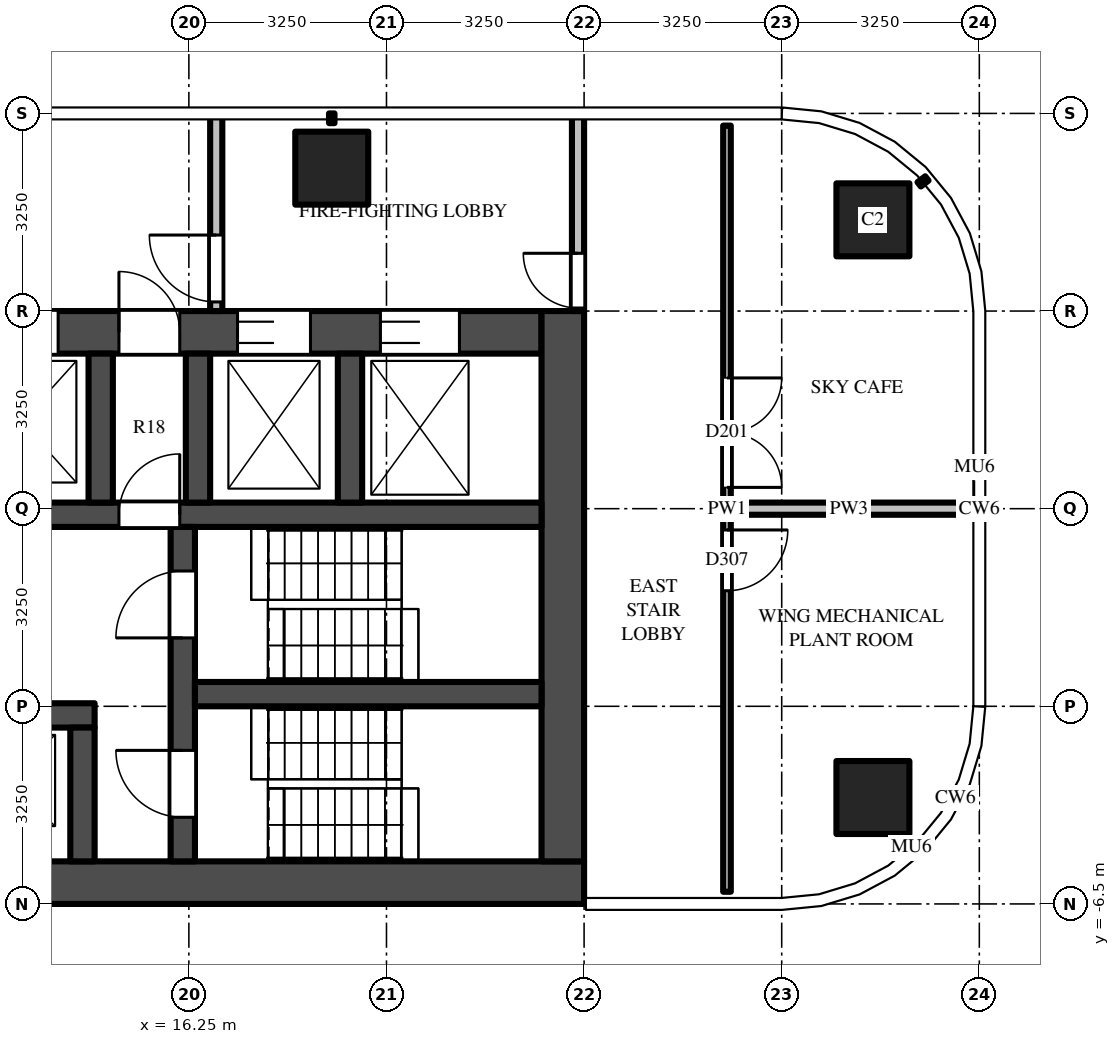
"""IFC4 building model, lengths in metres.
Left out: names, types, materials, properties, quantities, classifications, styles, units other than length and angle.
Written with IfcOpenShell. Run it as: python <this file> out.ifc"""

import sys

from ifc_helpers import new_model, si_unit, direction, frame, frame_2d, origin, origin_2d, place, context, subcontext, project, spatial, rectangle, extrude, source, transform, mapped, element, fill, save


model = new_model("IFC4")
c1 = context("Model", 3, precision=1e-05, world=origin(), true_north=direction((0.0, 1.0)))
c2 = subcontext(c1, "Body", "Model", "MODEL_VIEW")
j1 = project(units=[si_unit("LENGTHUNIT", "METRE"), si_unit("PLANEANGLEUNIT", "RADIAN")], contexts=[c1])
p1 = place(None, origin())
s1 = spatial("IfcSite", under=j1, at=p1, CompositionType="ELEMENT")
p2 = place(p1, origin())
s2 = spatial("IfcBuilding", under=s1, at=p2, CompositionType="ELEMENT")
p3 = place(p2, frame((0.0, 0.0, 156.0)))
s3 = spatial("IfcBuildingStorey", under=s2, at=p3, CompositionType="ELEMENT", Elevation=156.0)
m1 = source(origin(), c2, "Body", "SweptSolid", [
    extrude(rectangle(XDim=1.2, YDim=1.2, at=origin_2d()), origin(), (0.0, 0.0, 1.0), 6.0),
])
for number, where, z_axis, x_axis in (
    (1, (18.6, 5.6, 0.0), (0.0, 0.0, 1.0), (1.0, 0.0, 0.0)),
    (2, (27.5, 4.75, 0.0), (0.0, 0.0, 1.0), (1.0, 0.0, 0.0)),
    (3, (27.5, -4.75, 0.0), (0.0, 0.0, 1.0), (1.0, 0.0, 0.0)),
):
    element("IfcColumn", number, at=place(p3, frame(where, z_axis=z_axis, x_axis=x_axis)), inside=s3, PredefinedType="COLUMN", context=c2, shape_type="MappedRepresentation", body=[
        mapped(m1, transform((0.0, 0.0, 0.0))),
    ])
m2 = source(origin(), c2, "Body", "SweptSolid", [
    extrude(rectangle(XDim=16.55, YDim=0.7, at=frame_2d((8.275, 0.0))), origin(), (0.0, 0.0, 1.0), 5.8),
])
p4 = place(p3, frame((6.2, -6.15, 0.0), z_axis=(0.0, 0.0, 1.0), x_axis=(1.0, 0.0, 0.0)))
e4 = element("IfcWall", 4, at=p4, inside=s3, PredefinedType="SHEAR", context=c2, shape_type="MappedRepresentation", body=[
    mapped(m2, transform((0.0, 0.0, 0.0))),
])
m3 = source(origin(), c2, "Body", "SweptSolid", [
    extrude(rectangle(XDim=14.85, YDim=0.7, at=frame_2d((7.425, 0.0))), origin(), (0.0, 0.0, 1.0), 5.8),
])
p5 = place(p3, frame((7.2, 2.9, 0.0), z_axis=(0.0, 0.0, 1.0), x_axis=(1.0, 0.0, 0.0)))
e5 = element("IfcWall", 5, at=p5, inside=s3, PredefinedType="SHEAR", context=c2, shape_type="MappedRepresentation", body=[
    mapped(m3, transform((0.0, 0.0, 0.0))),
])
m4 = source(origin(), c2, "Body", "SweptSolid", [
    extrude(rectangle(XDim=1.1, YDim=2.1, at=frame_2d((0.55, 1.05))), frame((0.0, 0.36, 0.0), z_axis=(0.0, -1.0, 0.0), x_axis=(1.0, 0.0, 0.0)), (0.0, 0.0, 1.0), 0.72),
])
p6 = place(p5, frame((0.55, 0.0, 0.0)))
e6 = element("IfcOpeningElement", 6, at=p6, cuts=e5, PredefinedType="OPENING", context=c2, shape_type="MappedRepresentation", body=[
    mapped(m4, transform((0.0, 0.0, 0.0))),
])
p7 = place(p5, frame((3.15, 0.0, 0.0)))
e7 = element("IfcOpeningElement", 7, at=p7, cuts=e5, PredefinedType="OPENING", context=c2, shape_type="MappedRepresentation", body=[
    mapped(m4, transform((0.0, 0.0, 0.0))),
])
m5 = source(origin(), c2, "Body", "SweptSolid", [
    extrude(rectangle(XDim=1.2, YDim=2.1, at=frame_2d((0.6, 1.05))), frame((0.0, 0.36, 0.0), z_axis=(0.0, -1.0, 0.0), x_axis=(1.0, 0.0, 0.0)), (0.0, 0.0, 1.0), 0.72),
])
p8 = place(p5, frame((5.7, 0.0, 0.0)))
e8 = element("IfcOpeningElement", 8, at=p8, cuts=e5, PredefinedType="OPENING", context=c2, shape_type="MappedRepresentation", body=[
    mapped(m5, transform((0.0, 0.0, 0.0))),
])
m6 = source(origin(), c2, "Body", "SweptSolid", [
    extrude(rectangle(XDim=1.3, YDim=2.1, at=frame_2d((0.65, 1.05))), frame((0.0, 0.36, 0.0), z_axis=(0.0, -1.0, 0.0), x_axis=(1.0, 0.0, 0.0)), (0.0, 0.0, 1.0), 0.72),
])
p9 = place(p5, frame((12.2, 0.0, 0.0)))
e9 = element("IfcOpeningElement", 9, at=p9, cuts=e5, PredefinedType="OPENING", context=c2, shape_type="MappedRepresentation", body=[
    mapped(m6, transform((0.0, 0.0, 0.0))),
])
p10 = place(p5, frame((9.85, 0.0, 0.0)))
e10 = element("IfcOpeningElement", 10, at=p10, cuts=e5, PredefinedType="OPENING", context=c2, shape_type="MappedRepresentation", body=[
    mapped(m5, transform((0.0, 0.0, 0.0))),
])
m7 = source(origin(), c2, "Body", "SweptSolid", [
    extrude(rectangle(XDim=1.0, YDim=2.1, at=frame_2d((0.5, 1.05))), frame((0.0, 0.36, 0.0), z_axis=(0.0, -1.0, 0.0), x_axis=(1.0, 0.0, 0.0)), (0.0, 0.0, 1.0), 0.72),
])
p11 = place(p5, frame((7.9, 0.0, 0.0)))
e11 = element("IfcOpeningElement", 11, at=p11, cuts=e5, PredefinedType="OPENING", context=c2, shape_type="MappedRepresentation", body=[
    mapped(m7, transform((0.0, 0.0, 0.0))),
])
m8 = source(origin(), c2, "Body", "SweptSolid", [
    extrude(rectangle(XDim=9.05, YDim=0.7, at=frame_2d((4.525, 0.0))), origin(), (0.0, 0.0, 1.0), 5.8),
])
p12 = place(p3, frame((22.4, -5.8, 0.0), z_axis=(0.0, 0.0, 1.0), x_axis=(0.0, 1.0, 0.0)))
e12 = element("IfcWall", 12, at=p12, inside=s3, PredefinedType="SHEAR", context=c2, shape_type="MappedRepresentation", body=[
    mapped(m8, transform((0.0, 0.0, 0.0))),
])
m9 = source(origin(), c2, "Body", "SweptSolid", [
    extrude(rectangle(XDim=7.5, YDim=0.4, at=frame_2d((3.75, 0.0))), origin(), (0.0, 0.0, 1.0), 5.8),
])
p13 = place(p3, frame((7.2, -3.4, 0.0), z_axis=(0.0, 0.0, 1.0), x_axis=(1.0, 0.0, 0.0)))
e13 = element("IfcWall", 13, at=p13, inside=s3, PredefinedType="SHEAR", context=c2, shape_type="MappedRepresentation", body=[
    mapped(m9, transform((0.0, 0.0, 0.0))),
])
m10 = source(origin(), c2, "Body", "SweptSolid", [
    extrude(rectangle(XDim=1.1, YDim=2.1, at=frame_2d((0.55, 1.05))), frame((0.0, 0.21, 0.0), z_axis=(0.0, -1.0, 0.0), x_axis=(1.0, 0.0, 0.0)), (0.0, 0.0, 1.0), 0.42),
])
p14 = place(p13, frame((0.5, 0.0, 0.0)))
e14 = element("IfcOpeningElement", 14, at=p14, cuts=e13, PredefinedType="OPENING", context=c2, shape_type="MappedRepresentation", body=[
    mapped(m10, transform((0.0, 0.0, 0.0))),
])
p15 = place(p13, frame((3.0, 0.0, 0.0)))
e15 = element("IfcOpeningElement", 15, at=p15, cuts=e13, PredefinedType="OPENING", context=c2, shape_type="MappedRepresentation", body=[
    mapped(m10, transform((0.0, 0.0, 0.0))),
])
p16 = place(p13, frame((5.5, 0.0, 0.0)))
e16 = element("IfcOpeningElement", 16, at=p16, cuts=e13, PredefinedType="OPENING", context=c2, shape_type="MappedRepresentation", body=[
    mapped(m10, transform((0.0, 0.0, 0.0))),
])
m11 = source(origin(), c2, "Body", "SweptSolid", [
    extrude(rectangle(XDim=14.85, YDim=0.4, at=frame_2d((7.425, 0.0))), origin(), (0.0, 0.0, 1.0), 5.8),
])
p17 = place(p3, frame((7.2, -0.1, 0.0), z_axis=(0.0, 0.0, 1.0), x_axis=(1.0, 0.0, 0.0)))
e17 = element("IfcWall", 17, at=p17, inside=s3, PredefinedType="SHEAR", context=c2, shape_type="MappedRepresentation", body=[
    mapped(m11, transform((0.0, 0.0, 0.0))),
])
m12 = source(origin(), c2, "Body", "SweptSolid", [
    extrude(rectangle(XDim=1.0, YDim=2.1, at=frame_2d((0.5, 1.05))), frame((0.0, 0.21, 0.0), z_axis=(0.0, -1.0, 0.0), x_axis=(1.0, 0.0, 0.0)), (0.0, 0.0, 1.0), 0.42),
])
p18 = place(p17, frame((7.9, 0.0, 0.0)))
e18 = element("IfcOpeningElement", 18, at=p18, cuts=e17, PredefinedType="OPENING", context=c2, shape_type="MappedRepresentation", body=[
    mapped(m12, transform((0.0, 0.0, 0.0))),
])
m13 = source(origin(), c2, "Body", "SweptSolid", [
    extrude(rectangle(XDim=5.5, YDim=0.4, at=frame_2d((2.75, 0.0))), origin(), (0.0, 0.0, 1.0), 5.8),
])
p19 = place(p3, frame((16.15, -5.8, 0.0), z_axis=(0.0, 0.0, 1.0), x_axis=(0.0, 1.0, 0.0)))
e19 = element("IfcWall", 19, at=p19, inside=s3, PredefinedType="SHEAR", context=c2, shape_type="MappedRepresentation", body=[
    mapped(m13, transform((0.0, 0.0, 0.0))),
])
p20 = place(p19, frame((0.725, 0.0, 0.0)))
e20 = element("IfcOpeningElement", 20, at=p20, cuts=e19, PredefinedType="OPENING", context=c2, shape_type="MappedRepresentation", body=[
    mapped(m10, transform((0.0, 0.0, 0.0))),
])
p21 = place(p19, frame((3.675, 0.0, 0.0)))
e21 = element("IfcOpeningElement", 21, at=p21, cuts=e19, PredefinedType="OPENING", context=c2, shape_type="MappedRepresentation", body=[
    mapped(m10, transform((0.0, 0.0, 0.0))),
])
m14 = source(origin(), c2, "Body", "SweptSolid", [
    extrude(rectangle(XDim=5.7, YDim=0.4, at=frame_2d((2.85, 0.0))), origin(), (0.0, 0.0, 1.0), 5.8),
])
p22 = place(p3, frame((16.35, -3.05, 0.0), z_axis=(0.0, 0.0, 1.0), x_axis=(1.0, 0.0, 0.0)))
e22 = element("IfcWall", 22, at=p22, inside=s3, PredefinedType="SHEAR", context=c2, shape_type="MappedRepresentation", body=[
    mapped(m14, transform((0.0, 0.0, 0.0))),
])
m15 = source(origin(), c2, "Body", "SweptSolid", [
    extrude(rectangle(XDim=2.2, YDim=0.4, at=frame_2d((1.1, 0.0))), origin(), (0.0, 0.0, 1.0), 5.8),
])
p23 = place(p3, frame((14.5, -5.8, 0.0), z_axis=(0.0, 0.0, 1.0), x_axis=(0.0, 1.0, 0.0)))
e23 = element("IfcWall", 23, at=p23, inside=s3, PredefinedType="SHEAR", context=c2, shape_type="MappedRepresentation", body=[
    mapped(m15, transform((0.0, 0.0, 0.0))),
])
m16 = source(origin(), c2, "Body", "SweptSolid", [
    extrude(rectangle(XDim=2.45, YDim=0.4, at=frame_2d((1.225, 0.0))), origin(), (0.0, 0.0, 1.0), 5.8),
])
for number, where, z_axis, x_axis in (
    (24, (14.8, 0.1, 0.0), (0.0, 0.0, 1.0), (0.0, 1.0, 0.0)),
    (25, (16.4, 0.1, 0.0), (0.0, 0.0, 1.0), (0.0, 1.0, 0.0)),
    (26, (18.9, 0.1, 0.0), (0.0, 0.0, 1.0), (0.0, 1.0, 0.0)),
):
    element("IfcWall", number, at=place(p3, frame(where, z_axis=z_axis, x_axis=x_axis)), inside=s3, PredefinedType="SHEAR", context=c2, shape_type="MappedRepresentation", body=[
        mapped(m16, transform((0.0, 0.0, 0.0))),
    ])
m17 = source(origin(), c2, "Body", "SweptSolid", [
    extrude(rectangle(XDim=3.25, YDim=0.2, at=frame_2d((1.625, 0.0))), origin(), (0.0, 0.0, 1.0), 5.8),
])
p24 = place(p3, frame((16.7, 3.25, 0.0), z_axis=(0.0, 0.0, 1.0), x_axis=(0.0, 1.0, 0.0)))
e27 = element("IfcWall", 27, at=p24, inside=s3, PredefinedType="PARTITIONING", context=c2, shape_type="MappedRepresentation", body=[
    mapped(m17, transform((0.0, 0.0, 0.0))),
])
m18 = source(origin(), c2, "Body", "SweptSolid", [
    extrude(rectangle(XDim=1.1, YDim=2.1, at=frame_2d((0.55, 1.05))), frame((0.0, 0.11, 0.0), z_axis=(0.0, -1.0, 0.0), x_axis=(1.0, 0.0, 0.0)), (0.0, 0.0, 1.0), 0.22),
])
p25 = place(p24, frame((0.15, 0.0, 0.0)))
e28 = element("IfcOpeningElement", 28, at=p25, cuts=e27, PredefinedType="OPENING", context=c2, shape_type="MappedRepresentation", body=[
    mapped(m18, transform((0.0, 0.0, 0.0))),
])
p26 = place(p3, frame((22.65, 3.25, 0.0), z_axis=(0.0, 0.0, 1.0), x_axis=(0.0, 1.0, 0.0)))
e29 = element("IfcWall", 29, at=p26, inside=s3, PredefinedType="PARTITIONING", context=c2, shape_type="MappedRepresentation", body=[
    mapped(m17, transform((0.0, 0.0, 0.0))),
])
m19 = source(origin(), c2, "Body", "SweptSolid", [
    extrude(rectangle(XDim=0.9, YDim=2.1, at=frame_2d((0.45, 1.05))), frame((0.0, 0.11, 0.0), z_axis=(0.0, -1.0, 0.0), x_axis=(1.0, 0.0, 0.0)), (0.0, 0.0, 1.0), 0.22),
])
p27 = place(p26, frame((0.05, 0.0, 0.0)))
e30 = element("IfcOpeningElement", 30, at=p27, cuts=e29, PredefinedType="OPENING", context=c2, shape_type="MappedRepresentation", body=[
    mapped(m19, transform((0.0, 0.0, 0.0))),
])
p28 = place(p3, frame((25.1, 6.3, 0.0), z_axis=(0.0, 0.0, 1.0), x_axis=(0.0, -1.0, 0.0)))
e31 = element("IfcWall", 31, at=p28, inside=s3, PredefinedType="PARTITIONING", context=c2, shape_type="SweptSolid", body=[
    extrude(rectangle(XDim=12.6, YDim=0.125, at=frame_2d((6.3, 0.0))), origin(), (0.0, 0.0, 1.0), 4.88),
])
m20 = source(origin(), c2, "Body", "SweptSolid", [
    extrude(rectangle(XDim=1.0, YDim=2.1, at=frame_2d((0.5, 1.05))), frame((0.0, 0.073, 0.0), z_axis=(0.0, -1.0, 0.0), x_axis=(1.0, 0.0, 0.0)), (0.0, 0.0, 1.0), 0.145),
])
p29 = place(p28, frame((6.65, 0.0, 0.0)))
e32 = element("IfcOpeningElement", 32, at=p29, cuts=e31, PredefinedType="OPENING", context=c2, shape_type="MappedRepresentation", body=[
    mapped(m20, transform((0.0, 0.0, 0.0))),
])
m21 = source(origin(), c2, "Body", "SweptSolid", [
    extrude(rectangle(XDim=1.8, YDim=2.1, at=frame_2d((0.9, 1.05))), frame((0.0, 0.073, 0.0), z_axis=(0.0, -1.0, 0.0), x_axis=(1.0, 0.0, 0.0)), (0.0, 0.0, 1.0), 0.145),
])
p30 = place(p28, frame((4.15, 0.0, 0.0)))
e33 = element("IfcOpeningElement", 33, at=p30, cuts=e31, PredefinedType="OPENING", context=c2, shape_type="MappedRepresentation", body=[
    mapped(m21, transform((0.0, 0.0, 0.0))),
])
p31 = place(p3, frame((25.163, 0.0, 0.0), z_axis=(0.0, 0.0, 1.0), x_axis=(1.0, 0.0, 0.0)))
e34 = element("IfcWall", 34, at=p31, inside=s3, PredefinedType="PARTITIONING", context=c2, shape_type="SweptSolid", body=[
    extrude(rectangle(XDim=3.887, YDim=0.2, at=frame_2d((1.944, 0.0))), origin(), (0.0, 0.0, 1.0), 4.88),
])
m22 = source(origin(), c2, "Body", "SweptSolid", [
    extrude(rectangle(XDim=1.2, YDim=2.1, at=frame_2d((0.6, 1.05))), frame((0.0, -0.275, 0.0), z_axis=(0.0, -1.0, 0.0), x_axis=(1.0, 0.0, 0.0)), (0.0, 0.0, 1.0), 0.05),
])
p32 = place(p8, origin())
e35 = element("IfcDoor", 35, at=p32, inside=s3, OperationType="DOUBLE_DOOR_SLIDING", PredefinedType="DOOR", context=c2, shape_type="MappedRepresentation", body=[
    mapped(m22, transform((0.0, 0.0, 0.0))),
])
fill(e8, e35)
m23 = source(origin(), c2, "Body", "SweptSolid", [
    extrude(rectangle(XDim=1.3, YDim=2.1, at=frame_2d((0.65, 1.05))), frame((0.0, -0.275, 0.0), z_axis=(0.0, -1.0, 0.0), x_axis=(1.0, 0.0, 0.0)), (0.0, 0.0, 1.0), 0.05),
])
p33 = place(p9, origin())
e36 = element("IfcDoor", 36, at=p33, inside=s3, OperationType="DOUBLE_DOOR_SLIDING", PredefinedType="DOOR", context=c2, shape_type="MappedRepresentation", body=[
    mapped(m23, transform((0.0, 0.0, 0.0))),
])
fill(e9, e36)
p34 = place(p10, origin())
e37 = element("IfcDoor", 37, at=p34, inside=s3, OperationType="DOUBLE_DOOR_SLIDING", PredefinedType="DOOR", context=c2, shape_type="MappedRepresentation", body=[
    mapped(m22, transform((0.0, 0.0, 0.0))),
])
fill(e10, e37)
m24 = source(origin(), c2, "Body", "SweptSolid", [
    extrude(rectangle(XDim=1.1, YDim=2.1, at=frame_2d((0.55, 1.05))), frame((0.0, 0.025, 0.0), z_axis=(0.0, -1.0, 0.0), x_axis=(1.0, 0.0, 0.0)), (0.0, 0.0, 1.0), 0.05),
])
p35 = place(p20, origin())
e38 = element("IfcDoor", 38, at=p35, inside=s3, OperationType="SINGLE_SWING_RIGHT", PredefinedType="DOOR", context=c2, shape_type="MappedRepresentation", body=[
    mapped(m24, transform((0.0, 0.0, 0.0))),
])
fill(e20, e38)
p36 = place(p21, origin())
e39 = element("IfcDoor", 39, at=p36, inside=s3, OperationType="SINGLE_SWING_LEFT", PredefinedType="DOOR", context=c2, shape_type="MappedRepresentation", body=[
    mapped(m24, transform((0.0, 0.0, 0.0))),
])
fill(e21, e39)
m25 = source(origin(), c2, "Body", "SweptSolid", [
    extrude(rectangle(XDim=1.0, YDim=2.1, at=frame_2d((0.5, 1.05))), frame((0.0, 0.025, 0.0), z_axis=(0.0, -1.0, 0.0), x_axis=(1.0, 0.0, 0.0)), (0.0, 0.0, 1.0), 0.05),
])
p37 = place(p18, origin())
e40 = element("IfcDoor", 40, at=p37, inside=s3, OperationType="SINGLE_SWING_RIGHT", PredefinedType="DOOR", context=c2, shape_type="MappedRepresentation", body=[
    mapped(m25, transform((0.0, 0.0, 0.0))),
])
fill(e18, e40)
m26 = source(origin(), c2, "Body", "SweptSolid", [
    extrude(rectangle(XDim=1.0, YDim=2.1, at=frame_2d((0.5, 1.05))), frame((0.0, -0.275, 0.0), z_axis=(0.0, -1.0, 0.0), x_axis=(1.0, 0.0, 0.0)), (0.0, 0.0, 1.0), 0.05),
])
p38 = place(p11, origin())
e41 = element("IfcDoor", 41, at=p38, inside=s3, OperationType="SINGLE_SWING_LEFT", PredefinedType="DOOR", context=c2, shape_type="MappedRepresentation", body=[
    mapped(m26, transform((0.0, 0.0, 0.0))),
])
fill(e11, e41)
p39 = place(p25, origin())
e42 = element("IfcDoor", 42, at=p39, inside=s3, OperationType="SINGLE_SWING_RIGHT", PredefinedType="DOOR", context=c2, shape_type="MappedRepresentation", body=[
    mapped(m24, transform((0.0, 0.0, 0.0))),
])
fill(e28, e42)
m27 = source(origin(), c2, "Body", "SweptSolid", [
    extrude(rectangle(XDim=0.9, YDim=2.1, at=frame_2d((0.45, 1.05))), frame((0.0, 0.025, 0.0), z_axis=(0.0, -1.0, 0.0), x_axis=(1.0, 0.0, 0.0)), (0.0, 0.0, 1.0), 0.05),
])
p40 = place(p27, origin())
e43 = element("IfcDoor", 43, at=p40, inside=s3, OperationType="SINGLE_SWING_RIGHT", PredefinedType="DOOR", context=c2, shape_type="MappedRepresentation", body=[
    mapped(m27, transform((0.0, 0.0, 0.0))),
])
fill(e30, e43)
p41 = place(p29, origin())
e44 = element("IfcDoor", 44, at=p41, inside=s3, OperationType="SINGLE_SWING_LEFT", PredefinedType="DOOR", context=c2, shape_type="MappedRepresentation", body=[
    mapped(m25, transform((0.0, 0.0, 0.0))),
])
fill(e32, e44)
m28 = source(origin(), c2, "Body", "SweptSolid", [
    extrude(rectangle(XDim=1.8, YDim=2.1, at=frame_2d((0.9, 1.05))), frame((0.0, 0.025, 0.0), z_axis=(0.0, -1.0, 0.0), x_axis=(1.0, 0.0, 0.0)), (0.0, 0.0, 1.0), 0.05),
])
p42 = place(p30, origin())
e45 = element("IfcDoor", 45, at=p42, inside=s3, OperationType="DOUBLE_DOOR_SINGLE_SWING", PredefinedType="DOOR", context=c2, shape_type="MappedRepresentation", body=[
    mapped(m28, transform((0.0, 0.0, 0.0))),
])
fill(e33, e45)
save(model, sys.argv[1])
